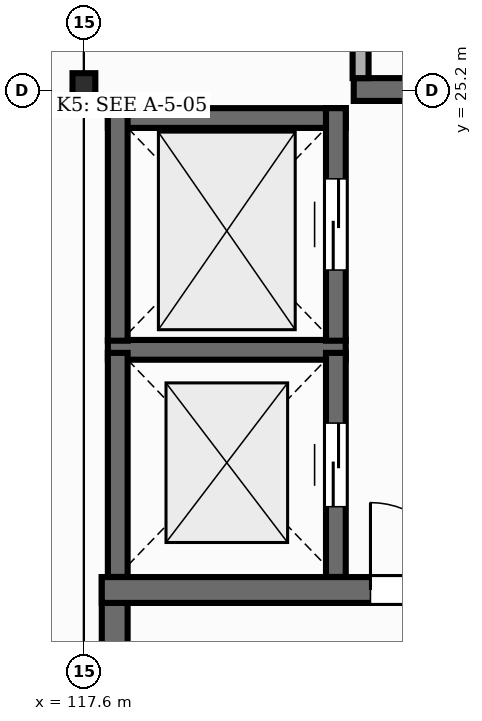
"""IFC4 building model, lengths in metres.
Left out: names, types, materials, properties, quantities, classifications, styles, units other than length and angle.
Written with IfcOpenShell. Run it as: python <this file> out.ifc"""

import sys

from ifc_helpers import new_model, si_unit, direction, frame, frame_2d, origin, origin_2d, place, context, subcontext, project, spatial, rectangle, i_section, extrude, element, fill, save


model = new_model("IFC4")
c1 = context("Model", 3, precision=1e-05, world=origin(), true_north=direction((0.0, 1.0)))
c2 = subcontext(c1, "Body", "Model", "MODEL_VIEW")
j1 = project(units=[si_unit("LENGTHUNIT", "METRE"), si_unit("PLANEANGLEUNIT", "RADIAN")], contexts=[c1])
p1 = place(None, origin())
s1 = spatial("IfcSite", under=j1, at=p1, CompositionType="ELEMENT")
p2 = place(p1, origin())
s2 = spatial("IfcBuilding", under=s1, at=p2, CompositionType="ELEMENT")
p3 = place(p2, origin())
s3 = spatial("IfcBuildingStorey", under=s2, at=p3, CompositionType="ELEMENT", Elevation=0.0)
p4 = place(p3, frame((117.6, 25.2, 0.0), z_axis=(0.0, 0.0, 1.0), x_axis=(1.0, 0.0, 0.0)))
e1 = element("IfcColumn", 1, at=p4, inside=s3, PredefinedType="COLUMN", context=c2, shape_type="SweptSolid", body=[
    extrude(i_section(OverallWidth=0.3, OverallDepth=0.45, WebThickness=0.014, FlangeThickness=0.026, FilletRadius=0.027, at=origin_2d()), origin(), (0.0, 0.0, 1.0), 5.4),
])
p5 = place(p3, frame((118.005, 8.805, 0.0), z_axis=(0.0, 0.0, 1.0), x_axis=(0.0, 1.0, 0.0)))
e2 = element("IfcWall", 2, at=p5, inside=s3, PredefinedType="SHEAR", context=c2, shape_type="SweptSolid", body=[
    extrude(rectangle(XDim=9.99, YDim=0.34, at=frame_2d((4.995, 0.0))), origin(), (0.0, 0.0, 1.0), 5.175),
])
p6 = place(p3, frame((117.835, 18.625, 0.0), z_axis=(0.0, 0.0, 1.0), x_axis=(1.0, 0.0, 0.0)))
e3 = element("IfcWall", 3, at=p6, inside=s3, PredefinedType="SHEAR", context=c2, shape_type="SweptSolid", body=[
    extrude(rectangle(XDim=5.25, YDim=0.34, at=frame_2d((2.625, 0.0))), origin(), (0.0, 0.0, 1.0), 5.175),
])
p7 = place(p6, frame((3.535, 0.0, 0.0)))
e4 = element("IfcOpeningElement", 4, at=p7, cuts=e3, PredefinedType="OPENING", context=c2, shape_type="SweptSolid", body=[
    extrude(rectangle(XDim=1.15, YDim=2.15, at=frame_2d((0.575, 1.075))), frame((0.0, 0.18, 0.0), z_axis=(0.0, -1.0, 0.0), x_axis=(1.0, 0.0, 0.0)), (0.0, 0.0, 1.0), 0.36),
])
p8 = place(p3, frame((117.915, 21.785, 0.0), z_axis=(0.0, 0.0, 1.0), x_axis=(1.0, 0.0, 0.0)))
e5 = element("IfcWall", 5, at=p8, inside=s3, PredefinedType="SHEAR", context=c2, shape_type="SweptSolid", body=[
    extrude(rectangle(XDim=3.13, YDim=0.26, at=frame_2d((1.565, 0.0))), origin(), (0.0, 0.0, 1.0), 5.175),
])
p9 = place(p3, frame((118.045, 18.797, 0.0), z_axis=(0.0, 0.0, 1.0), x_axis=(0.0, 1.0, 0.0)))
e6 = element("IfcWall", 6, at=p9, inside=s3, PredefinedType="SHEAR", context=c2, shape_type="SweptSolid", body=[
    extrude(rectangle(XDim=2.948, YDim=0.26, at=frame_2d((1.474, 0.0))), origin(), (0.0, 0.0, 1.0), 5.175),
])
p10 = place(p3, frame((120.915, 18.797, 0.0), z_axis=(0.0, 0.0, 1.0), x_axis=(0.0, 1.0, 0.0)))
e7 = element("IfcWall", 7, at=p10, inside=s3, PredefinedType="SHEAR", context=c2, shape_type="SweptSolid", body=[
    extrude(rectangle(XDim=2.948, YDim=0.26, at=frame_2d((1.474, 0.0))), origin(), (0.0, 0.0, 1.0), 5.175),
])
p11 = place(p10, frame((0.924, 0.0, 0.0)))
e8 = element("IfcOpeningElement", 8, at=p11, cuts=e7, PredefinedType="OPENING", context=c2, shape_type="SweptSolid", body=[
    extrude(rectangle(XDim=1.1, YDim=2.15, at=frame_2d((0.55, 1.075))), frame((0.0, 0.14, 0.0), z_axis=(0.0, -1.0, 0.0), x_axis=(1.0, 0.0, 0.0)), (0.0, 0.0, 1.0), 0.28),
])
p12 = place(p3, frame((117.915, 24.835, 0.0), z_axis=(0.0, 0.0, 1.0), x_axis=(1.0, 0.0, 0.0)))
e9 = element("IfcWall", 9, at=p12, inside=s3, PredefinedType="SHEAR", context=c2, shape_type="SweptSolid", body=[
    extrude(rectangle(XDim=3.13, YDim=0.26, at=frame_2d((1.565, 0.0))), origin(), (0.0, 0.0, 1.0), 5.175),
])
p13 = place(p3, frame((118.045, 21.905, 0.0), z_axis=(0.0, 0.0, 1.0), x_axis=(0.0, 1.0, 0.0)))
e10 = element("IfcWall", 10, at=p13, inside=s3, PredefinedType="SHEAR", context=c2, shape_type="SweptSolid", body=[
    extrude(rectangle(XDim=3.06, YDim=0.26, at=frame_2d((1.53, 0.0))), origin(), (0.0, 0.0, 1.0), 5.175),
])
p14 = place(p3, frame((120.915, 21.905, 0.0), z_axis=(0.0, 0.0, 1.0), x_axis=(0.0, 1.0, 0.0)))
e11 = element("IfcWall", 11, at=p14, inside=s3, PredefinedType="SHEAR", context=c2, shape_type="SweptSolid", body=[
    extrude(rectangle(XDim=3.06, YDim=0.26, at=frame_2d((1.53, 0.0))), origin(), (0.0, 0.0, 1.0), 5.175),
])
p15 = place(p14, frame((0.93, 0.0, 0.0)))
e12 = element("IfcOpeningElement", 12, at=p15, cuts=e11, PredefinedType="OPENING", context=c2, shape_type="SweptSolid", body=[
    extrude(rectangle(XDim=1.2, YDim=2.15, at=frame_2d((0.6, 1.075))), frame((0.0, 0.14, 0.0), z_axis=(0.0, -1.0, 0.0), x_axis=(1.0, 0.0, 0.0)), (0.0, 0.0, 1.0), 0.28),
])
p16 = place(p3, frame((121.15, 25.21, 0.0), z_axis=(0.0, 0.0, 1.0), x_axis=(1.0, 0.0, 0.0)))
e13 = element("IfcWall", 13, at=p16, inside=s3, PredefinedType="SHEAR", context=c2, shape_type="SweptSolid", body=[
    extrude(rectangle(XDim=4.87, YDim=0.3, at=frame_2d((2.435, 0.0))), origin(), (0.0, 0.0, 1.0), 5.175),
])
p17 = place(p16, frame((1.45, 0.0, 0.0)))
e14 = element("IfcOpeningElement", 14, at=p17, cuts=e13, PredefinedType="OPENING", context=c2, shape_type="SweptSolid", body=[
    extrude(rectangle(XDim=1.5, YDim=2.2, at=frame_2d((0.75, 1.1))), frame((0.0, 0.16, 0.0), z_axis=(0.0, -1.0, 0.0), x_axis=(1.0, 0.0, 0.0)), (0.0, 0.0, 1.0), 0.32),
])
p18 = place(p3, frame((121.24, 25.36, 0.0), z_axis=(0.0, 0.0, 1.0), x_axis=(0.0, 1.0, 0.0)))
e15 = element("IfcWall", 15, at=p18, inside=s3, PredefinedType="STANDARD", context=c2, shape_type="SweptSolid", body=[
    extrude(rectangle(XDim=8.09, YDim=0.21, at=frame_2d((4.045, 0.0))), origin(), (0.0, 0.0, 1.0), 5.175),
])
p19 = place(p7, origin())
e16 = element("IfcDoor", 16, at=p19, inside=s3, OperationType="SINGLE_SWING_LEFT", PredefinedType="DOOR", context=c2, shape_type="SweptSolid", body=[
    extrude(rectangle(XDim=1.15, YDim=2.15, at=frame_2d((0.575, 1.075))), frame((0.0, 0.025, 0.0), z_axis=(0.0, -1.0, 0.0), x_axis=(1.0, 0.0, 0.0)), (0.0, 0.0, 1.0), 0.05),
])
fill(e4, e16)
p20 = place(p11, origin())
e17 = element("IfcDoor", 17, at=p20, inside=s3, OperationType="DOUBLE_DOOR_SLIDING", PredefinedType="DOOR", context=c2, shape_type="SweptSolid", body=[
    extrude(rectangle(XDim=1.1, YDim=2.15, at=frame_2d((0.55, 1.075))), frame((0.0, 0.025, 0.0), z_axis=(0.0, -1.0, 0.0), x_axis=(1.0, 0.0, 0.0)), (0.0, 0.0, 1.0), 0.05),
])
fill(e8, e17)
p21 = place(p15, origin())
e18 = element("IfcDoor", 18, at=p21, inside=s3, OperationType="DOUBLE_DOOR_SLIDING", PredefinedType="DOOR", context=c2, shape_type="SweptSolid", body=[
    extrude(rectangle(XDim=1.2, YDim=2.15, at=frame_2d((0.6, 1.075))), frame((0.0, 0.025, 0.0), z_axis=(0.0, -1.0, 0.0), x_axis=(1.0, 0.0, 0.0)), (0.0, 0.0, 1.0), 0.05),
])
fill(e12, e18)
save(model, sys.argv[1])
